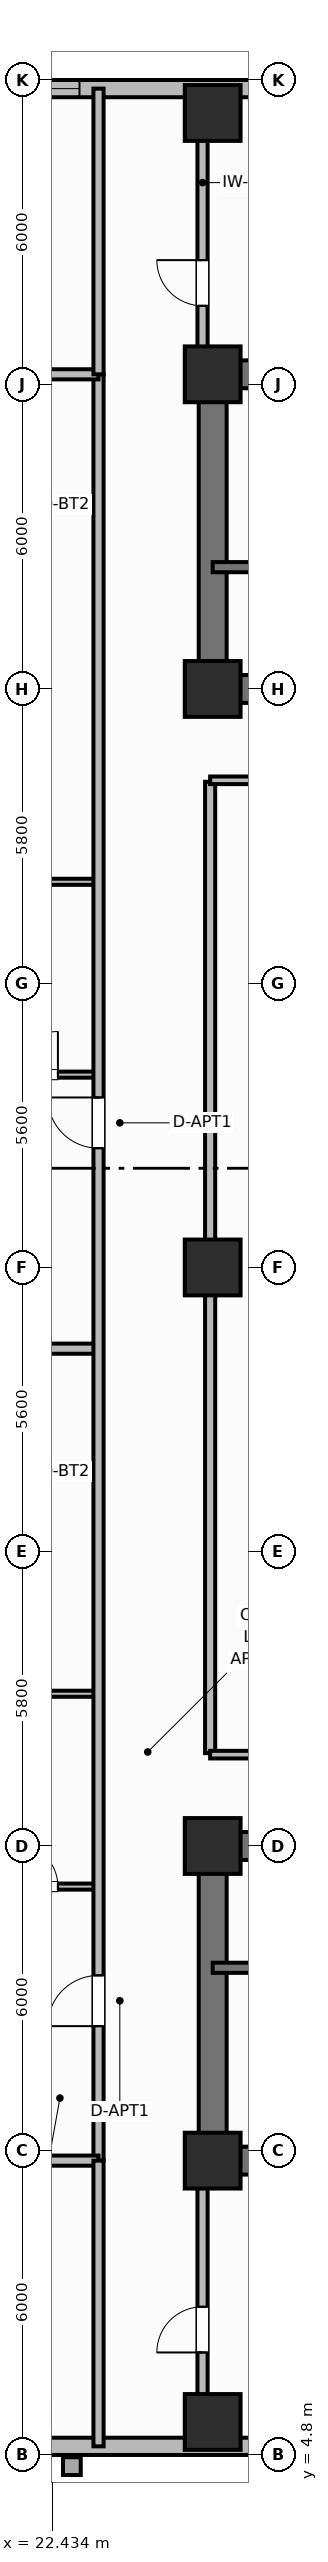
"""IFC4 building model, lengths in metres.
Left out: names, types, materials, properties, quantities, classifications, styles, units other than length and angle.
Written with IfcOpenShell. Run it as: python <this file> out.ifc"""

import sys

from ifc_helpers import new_model, si_unit, direction, frame, frame_2d, origin, origin_2d, place, context, subcontext, project, spatial, rectangle, extrude, element, fill, save


model = new_model("IFC4")
c1 = context("Model", 3, precision=1e-05, world=origin(), true_north=direction((0.0, 1.0)))
c2 = subcontext(c1, "Body", "Model", "MODEL_VIEW")
j1 = project(units=[si_unit("LENGTHUNIT", "METRE"), si_unit("PLANEANGLEUNIT", "RADIAN")], contexts=[c1])
p1 = place(None, origin())
s1 = spatial("IfcSite", under=j1, at=p1, CompositionType="ELEMENT")
p2 = place(p1, origin())
s2 = spatial("IfcBuilding", under=s1, at=p2, CompositionType="ELEMENT")
p3 = place(p2, frame((0.0, 0.0, 84.1)))
s3 = spatial("IfcBuildingStorey", under=s2, at=p3, CompositionType="ELEMENT", Elevation=84.1)
p4 = place(p3, frame((52.8, 10.6, 0.0), z_axis=(0.0, 0.0, 1.0), x_axis=(-1.0, 0.0, 0.0)))
e1 = element("IfcWall", 1, at=p4, inside=s3, PredefinedType="SHEAR", context=c2, shape_type="SweptSolid", body=[
    extrude(rectangle(XDim=27.2, YDim=0.55, at=frame_2d((13.6, 0.0))), origin(), (0.0, 0.0, 1.0), 4.2),
])
p5 = place(p3, frame((25.6, 10.875, 0.0), z_axis=(0.0, 0.0, 1.0), x_axis=(0.0, 1.0, 0.0)))
e2 = element("IfcWall", 2, at=p5, inside=s3, PredefinedType="SHEAR", context=c2, shape_type="SweptSolid", body=[
    extrude(rectangle(XDim=5.65, YDim=0.55, at=frame_2d((2.825, 0.0))), origin(), (0.0, 0.0, 1.0), 4.2),
])
p6 = place(p3, frame((25.6, 16.8, 0.0), z_axis=(0.0, 0.0, 1.0), x_axis=(1.0, 0.0, 0.0)))
e3 = element("IfcWall", 3, at=p6, inside=s3, PredefinedType="SHEAR", context=c2, shape_type="SweptSolid", body=[
    extrude(rectangle(XDim=27.2, YDim=0.55, at=frame_2d((13.6, 0.0))), origin(), (0.0, 0.0, 1.0), 4.2),
])
p7 = place(p6, frame((1.8, 0.0, 0.0)))
e4 = element("IfcOpeningElement", 4, at=p7, cuts=e3, PredefinedType="OPENING", context=c2, shape_type="SweptSolid", body=[
    extrude(rectangle(XDim=1.1, YDim=2.15, at=frame_2d((0.55, 1.075))), frame((0.0, 0.285, 0.0), z_axis=(0.0, -1.0, 0.0), x_axis=(1.0, 0.0, 0.0)), (0.0, 0.0, 1.0), 0.57),
])
p8 = place(p6, frame((5.6, 0.0, 0.0)))
e5 = element("IfcOpeningElement", 5, at=p8, cuts=e3, PredefinedType="OPENING", context=c2, shape_type="SweptSolid", body=[
    extrude(rectangle(XDim=0.85, YDim=2.1, at=frame_2d((0.425, 1.05))), frame((0.0, 0.285, 0.0), z_axis=(0.0, -1.0, 0.0), x_axis=(1.0, 0.0, 0.0)), (0.0, 0.0, 1.0), 0.57),
])
p9 = place(p6, frame((13.0, 0.0, 0.0)))
e6 = element("IfcOpeningElement", 6, at=p9, cuts=e3, PredefinedType="OPENING", context=c2, shape_type="SweptSolid", body=[
    extrude(rectangle(XDim=1.2, YDim=2.15, at=frame_2d((0.6, 1.075))), frame((0.0, 0.285, 0.0), z_axis=(0.0, -1.0, 0.0), x_axis=(1.0, 0.0, 0.0)), (0.0, 0.0, 1.0), 0.57),
])
p10 = place(p6, frame((20.4, 0.0, 0.0)))
e7 = element("IfcOpeningElement", 7, at=p10, cuts=e3, PredefinedType="OPENING", context=c2, shape_type="SweptSolid", body=[
    extrude(rectangle(XDim=1.3, YDim=2.2, at=frame_2d((0.65, 1.1))), frame((0.0, 0.285, 0.0), z_axis=(0.0, -1.0, 0.0), x_axis=(1.0, 0.0, 0.0)), (0.0, 0.0, 1.0), 0.57),
])
p11 = place(p6, frame((24.65, 0.0, 0.0)))
e8 = element("IfcOpeningElement", 8, at=p11, cuts=e3, PredefinedType="OPENING", context=c2, shape_type="SweptSolid", body=[
    extrude(rectangle(XDim=0.85, YDim=2.1, at=frame_2d((0.425, 1.05))), frame((0.0, 0.285, 0.0), z_axis=(0.0, -1.0, 0.0), x_axis=(1.0, 0.0, 0.0)), (0.0, 0.0, 1.0), 0.57),
])
p12 = place(p3, frame((25.6, 45.8, 0.0), z_axis=(0.0, 0.0, 1.0), x_axis=(1.0, 0.0, 0.0)))
e9 = element("IfcWall", 9, at=p12, inside=s3, PredefinedType="SHEAR", context=c2, shape_type="SweptSolid", body=[
    extrude(rectangle(XDim=27.2, YDim=0.55, at=frame_2d((13.6, 0.0))), origin(), (0.0, 0.0, 1.0), 4.2),
])
p13 = place(p3, frame((25.6, 39.875, 0.0), z_axis=(0.0, 0.0, 1.0), x_axis=(0.0, 1.0, 0.0)))
e10 = element("IfcWall", 10, at=p13, inside=s3, PredefinedType="SHEAR", context=c2, shape_type="SweptSolid", body=[
    extrude(rectangle(XDim=5.65, YDim=0.55, at=frame_2d((2.825, 0.0))), origin(), (0.0, 0.0, 1.0), 4.2),
])
p14 = place(p3, frame((52.8, 39.6, 0.0), z_axis=(0.0, 0.0, 1.0), x_axis=(-1.0, 0.0, 0.0)))
e11 = element("IfcWall", 11, at=p14, inside=s3, PredefinedType="SHEAR", context=c2, shape_type="SweptSolid", body=[
    extrude(rectangle(XDim=27.2, YDim=0.55, at=frame_2d((13.6, 0.0))), origin(), (0.0, 0.0, 1.0), 4.2),
])
p15 = place(p14, frame((24.2, 0.0, 0.0)))
e12 = element("IfcOpeningElement", 12, at=p15, cuts=e11, PredefinedType="OPENING", context=c2, shape_type="SweptSolid", body=[
    extrude(rectangle(XDim=1.1, YDim=2.15, at=frame_2d((0.55, 1.075))), frame((0.0, 0.285, 0.0), z_axis=(0.0, -1.0, 0.0), x_axis=(1.0, 0.0, 0.0)), (0.0, 0.0, 1.0), 0.57),
])
p16 = place(p14, frame((20.55, 0.0, 0.0)))
e13 = element("IfcOpeningElement", 13, at=p16, cuts=e11, PredefinedType="OPENING", context=c2, shape_type="SweptSolid", body=[
    extrude(rectangle(XDim=0.95, YDim=2.1, at=frame_2d((0.475, 1.05))), frame((0.0, 0.285, 0.0), z_axis=(0.0, -1.0, 0.0), x_axis=(1.0, 0.0, 0.0)), (0.0, 0.0, 1.0), 0.57),
])
p17 = place(p14, frame((15.1, 0.0, 0.0)))
e14 = element("IfcOpeningElement", 14, at=p17, cuts=e11, PredefinedType="OPENING", context=c2, shape_type="SweptSolid", body=[
    extrude(rectangle(XDim=1.2, YDim=2.15, at=frame_2d((0.6, 1.075))), frame((0.0, 0.285, 0.0), z_axis=(0.0, -1.0, 0.0), x_axis=(1.0, 0.0, 0.0)), (0.0, 0.0, 1.0), 0.57),
])
p18 = place(p14, frame((11.3, 0.0, 0.0)))
e15 = element("IfcOpeningElement", 15, at=p18, cuts=e11, PredefinedType="OPENING", context=c2, shape_type="SweptSolid", body=[
    extrude(rectangle(XDim=1.3, YDim=2.2, at=frame_2d((0.65, 1.1))), frame((0.0, 0.285, 0.0), z_axis=(0.0, -1.0, 0.0), x_axis=(1.0, 0.0, 0.0)), (0.0, 0.0, 1.0), 0.57),
])
p19 = place(p14, frame((7.25, 0.0, 0.0)))
e16 = element("IfcOpeningElement", 16, at=p19, cuts=e11, PredefinedType="OPENING", context=c2, shape_type="SweptSolid", body=[
    extrude(rectangle(XDim=0.85, YDim=2.1, at=frame_2d((0.425, 1.05))), frame((0.0, 0.285, 0.0), z_axis=(0.0, -1.0, 0.0), x_axis=(1.0, 0.0, 0.0)), (0.0, 0.0, 1.0), 0.57),
])
p20 = place(p14, frame((3.0, 0.0, 0.0)))
e17 = element("IfcOpeningElement", 17, at=p20, cuts=e11, PredefinedType="OPENING", context=c2, shape_type="SweptSolid", body=[
    extrude(rectangle(XDim=0.9, YDim=2.1, at=frame_2d((0.45, 1.05))), frame((0.0, 0.285, 0.0), z_axis=(0.0, -1.0, 0.0), x_axis=(1.0, 0.0, 0.0)), (0.0, 0.0, 1.0), 0.57),
])
for number, where, z_axis, x_axis in (
    (18, (25.6, 10.6, 0.0), (0.0, 0.0, 1.0), (1.0, 0.0, 0.0)),
    (19, (25.6, 16.8, 0.0), (0.0, 0.0, 1.0), (1.0, 0.0, 0.0)),
    (20, (25.6, 39.6, 0.0), (0.0, 0.0, 1.0), (1.0, 0.0, 0.0)),
    (21, (25.6, 45.8, 0.0), (0.0, 0.0, 1.0), (1.0, 0.0, 0.0)),
    (22, (25.6, 28.2, 0.0), (0.0, 0.0, 1.0), (1.0, 0.0, 0.0)),
    (23, (25.6, 5.45, 0.0), (0.0, 0.0, 1.0), (1.0, 0.0, 0.0)),
    (24, (25.6, 50.95, 0.0), (0.0, 0.0, 1.0), (1.0, 0.0, 0.0)),
):
    element("IfcColumn", number, at=place(p3, frame(where, z_axis=z_axis, x_axis=x_axis)), inside=s3, PredefinedType="COLUMN", context=c2, shape_type="SweptSolid", body=[
        extrude(rectangle(XDim=1.1, YDim=1.1, at=origin_2d()), origin(), (0.0, 0.0, 1.0), 4.2),
    ])
p21 = place(p3, frame((18.6, 4.97, 0.0), z_axis=(0.0, 0.0, 1.0), x_axis=(1.0, 0.0, 0.0)))
e25 = element("IfcWall", 25, at=p21, inside=s3, PredefinedType="SOLIDWALL", context=c2, shape_type="SweptSolid", body=[
    extrude(rectangle(XDim=8.45, YDim=0.34, at=frame_2d((4.225, 0.0))), origin(), (0.0, 0.0, 1.0), 3.2),
])
p22 = place(p21, frame((1.538, 0.0, 0.85)))
e26 = element("IfcOpeningElement", 26, at=p22, cuts=e25, PredefinedType="OPENING", context=c2, shape_type="SweptSolid", body=[
    extrude(rectangle(XDim=1.8, YDim=1.85, at=frame_2d((0.9, 0.925))), frame((0.0, 0.18, 0.0), z_axis=(0.0, -1.0, 0.0), x_axis=(1.0, 0.0, 0.0)), (0.0, 0.0, 1.0), 0.36),
])
p23 = place(p3, frame((28.35, 51.43, 0.0), z_axis=(0.0, 0.0, 1.0), x_axis=(-1.0, 0.0, 0.0)))
e27 = element("IfcWall", 27, at=p23, inside=s3, PredefinedType="SOLIDWALL", context=c2, shape_type="SweptSolid", body=[
    extrude(rectangle(XDim=9.75, YDim=0.34, at=frame_2d((4.875, 0.0))), origin(), (0.0, 0.0, 1.0), 3.2),
])
p24 = place(p23, frame((5.375, 0.0, 0.95)))
e28 = element("IfcOpeningElement", 28, at=p24, cuts=e27, PredefinedType="OPENING", context=c2, shape_type="SweptSolid", body=[
    extrude(rectangle(XDim=1.1, YDim=1.65, at=frame_2d((0.55, 0.825))), frame((0.0, 0.18, 0.0), z_axis=(0.0, -1.0, 0.0), x_axis=(1.0, 0.0, 0.0)), (0.0, 0.0, 1.0), 0.36),
])
p25 = place(p23, frame((7.142, 0.0, 0.95)))
e29 = element("IfcOpeningElement", 29, at=p25, cuts=e27, PredefinedType="OPENING", context=c2, shape_type="SweptSolid", body=[
    extrude(rectangle(XDim=1.1, YDim=1.65, at=frame_2d((0.55, 0.825))), frame((0.0, 0.18, 0.0), z_axis=(0.0, -1.0, 0.0), x_axis=(1.0, 0.0, 0.0)), (0.0, 0.0, 1.0), 0.36),
])
p26 = place(p3, frame((25.6, 14.4, 0.0), z_axis=(0.0, 0.0, 1.0), x_axis=(1.0, 0.0, 0.0)))
e30 = element("IfcWall", 30, at=p26, inside=s3, PredefinedType="SHEAR", context=c2, shape_type="SweptSolid", body=[
    extrude(rectangle(XDim=9.55, YDim=0.2, at=frame_2d((4.775, 0.0))), origin(), (0.0, 0.0, 1.0), 4.2),
])
p27 = place(p26, frame((1.05, 0.0, 0.0)))
e31 = element("IfcOpeningElement", 31, at=p27, cuts=e30, PredefinedType="OPENING", context=c2, shape_type="SweptSolid", body=[
    extrude(rectangle(XDim=1.1, YDim=2.15, at=frame_2d((0.55, 1.075))), frame((0.0, 0.11, 0.0), z_axis=(0.0, -1.0, 0.0), x_axis=(1.0, 0.0, 0.0)), (0.0, 0.0, 1.0), 0.22),
])
p28 = place(p3, frame((35.15, 42.0, 0.0), z_axis=(0.0, 0.0, 1.0), x_axis=(-1.0, 0.0, 0.0)))
e32 = element("IfcWall", 32, at=p28, inside=s3, PredefinedType="SHEAR", context=c2, shape_type="SweptSolid", body=[
    extrude(rectangle(XDim=9.55, YDim=0.2, at=frame_2d((4.775, 0.0))), origin(), (0.0, 0.0, 1.0), 4.2),
])
p29 = place(p28, frame((7.25, 0.0, 0.0)))
e33 = element("IfcOpeningElement", 33, at=p29, cuts=e32, PredefinedType="OPENING", context=c2, shape_type="SweptSolid", body=[
    extrude(rectangle(XDim=1.1, YDim=2.15, at=frame_2d((0.55, 1.075))), frame((0.0, 0.11, 0.0), z_axis=(0.0, -1.0, 0.0), x_axis=(1.0, 0.0, 0.0)), (0.0, 0.0, 1.0), 0.22),
])
p30 = place(p3, frame((25.55, 18.63, 0.0), z_axis=(0.0, 0.0, 1.0), x_axis=(0.0, 1.0, 0.0)))
e34 = element("IfcWall", 34, at=p30, inside=s3, PredefinedType="PARTITIONING", context=c2, shape_type="SweptSolid", body=[
    extrude(rectangle(XDim=19.14, YDim=0.2, at=frame_2d((9.57, 0.0))), origin(), (0.0, 0.0, 1.0), 3.03),
])
for number, where, z_axis, x_axis in (
    (35, (25.55, 18.6, 0.0), (0.0, 0.0, 1.0), (1.0, 0.0, 0.0)),
    (36, (25.55, 37.8, 0.0), (0.0, 0.0, 1.0), (1.0, 0.0, 0.0)),
):
    element("IfcWall", number, at=place(p3, frame(where, z_axis=z_axis, x_axis=x_axis)), inside=s3, PredefinedType="PARTITIONING", context=c2, shape_type="SweptSolid", body=[
        extrude(rectangle(XDim=12.5, YDim=0.15, at=frame_2d((6.25, 0.0))), origin(), (0.0, 0.0, 1.0), 3.03),
    ])
p31 = place(p3, frame((21.1, 16.0, 0.0), z_axis=(0.0, 0.0, 1.0), x_axis=(1.0, 0.0, 0.0)))
e37 = element("IfcWall", 37, at=p31, inside=s3, PredefinedType="PARTITIONING", context=c2, shape_type="SweptSolid", body=[
    extrude(rectangle(XDim=2.25, YDim=0.12, at=frame_2d((1.125, 0.0))), origin(), (0.0, 0.0, 1.0), 3.03),
])
p32 = place(p31, frame((0.6, 0.0, 0.0)))
e38 = element("IfcOpeningElement", 38, at=p32, cuts=e37, PredefinedType="OPENING", context=c2, shape_type="SweptSolid", body=[
    extrude(rectangle(XDim=0.85, YDim=2.1, at=frame_2d((0.425, 1.05))), frame((0.0, 0.07, 0.0), z_axis=(0.0, -1.0, 0.0), x_axis=(1.0, 0.0, 0.0)), (0.0, 0.0, 1.0), 0.14),
])
p33 = place(p3, frame((21.1, 19.8, 0.0), z_axis=(0.0, 0.0, 1.0), x_axis=(1.0, 0.0, 0.0)))
e39 = element("IfcWall", 39, at=p33, inside=s3, PredefinedType="PARTITIONING", context=c2, shape_type="SweptSolid", body=[
    extrude(rectangle(XDim=2.25, YDim=0.12, at=frame_2d((1.125, 0.0))), origin(), (0.0, 0.0, 1.0), 3.03),
])
p34 = place(p3, frame((14.856, 26.6, 0.0), z_axis=(0.0, 0.0, 1.0), x_axis=(1.0, 0.0, 0.0)))
e40 = element("IfcWall", 40, at=p34, inside=s3, PredefinedType="PARTITIONING", context=c2, shape_type="SweptSolid", body=[
    extrude(rectangle(XDim=8.494, YDim=0.2, at=frame_2d((4.247, 0.0))), origin(), (0.0, 0.0, 1.0), 3.03),
])
p35 = place(p3, frame((21.1, 32.0, 0.0), z_axis=(0.0, 0.0, 1.0), x_axis=(1.0, 0.0, 0.0)))
e41 = element("IfcWall", 41, at=p35, inside=s3, PredefinedType="PARTITIONING", context=c2, shape_type="SweptSolid", body=[
    extrude(rectangle(XDim=2.25, YDim=0.12, at=frame_2d((1.125, 0.0))), origin(), (0.0, 0.0, 1.0), 3.03),
])
p36 = place(p35, frame((0.6, 0.0, 0.0)))
e42 = element("IfcOpeningElement", 42, at=p36, cuts=e41, PredefinedType="OPENING", context=c2, shape_type="SweptSolid", body=[
    extrude(rectangle(XDim=0.85, YDim=2.1, at=frame_2d((0.425, 1.05))), frame((0.0, 0.07, 0.0), z_axis=(0.0, -1.0, 0.0), x_axis=(1.0, 0.0, 0.0)), (0.0, 0.0, 1.0), 0.14),
])
p37 = place(p3, frame((21.1, 35.8, 0.0), z_axis=(0.0, 0.0, 1.0), x_axis=(1.0, 0.0, 0.0)))
e43 = element("IfcWall", 43, at=p37, inside=s3, PredefinedType="PARTITIONING", context=c2, shape_type="SweptSolid", body=[
    extrude(rectangle(XDim=2.25, YDim=0.12, at=frame_2d((1.125, 0.0))), origin(), (0.0, 0.0, 1.0), 3.03),
])
p38 = place(p3, frame((23.35, 10.6, 0.0), z_axis=(0.0, 0.0, 1.0), x_axis=(0.0, 1.0, 0.0)))
e44 = element("IfcWall", 44, at=p38, inside=s3, PredefinedType="PARTITIONING", context=c2, shape_type="SweptSolid", body=[
    extrude(rectangle(XDim=35.2, YDim=0.2, at=frame_2d((17.6, 0.0))), origin(), (0.0, 0.0, 1.0), 3.03),
])
p39 = place(p38, frame((2.65, 0.0, 0.0)))
e45 = element("IfcOpeningElement", 45, at=p39, cuts=e44, PredefinedType="OPENING", context=c2, shape_type="SweptSolid", body=[
    extrude(rectangle(XDim=1.0, YDim=2.15, at=frame_2d((0.5, 1.075))), frame((0.0, 0.11, 0.0), z_axis=(0.0, -1.0, 0.0), x_axis=(1.0, 0.0, 0.0)), (0.0, 0.0, 1.0), 0.22),
])
p40 = place(p38, frame((19.95, 0.0, 0.0)))
e46 = element("IfcOpeningElement", 46, at=p40, cuts=e44, PredefinedType="OPENING", context=c2, shape_type="SweptSolid", body=[
    extrude(rectangle(XDim=1.0, YDim=2.15, at=frame_2d((0.5, 1.075))), frame((0.0, 0.11, 0.0), z_axis=(0.0, -1.0, 0.0), x_axis=(1.0, 0.0, 0.0)), (0.0, 0.0, 1.0), 0.22),
])
for number, where, z_axis, x_axis in (
    (47, (14.99, 10.6, 0.0), (0.0, 0.0, 1.0), (1.0, 0.0, 0.0)),
    (48, (14.99, 45.8, 0.0), (0.0, 0.0, 1.0), (1.0, 0.0, 0.0)),
):
    element("IfcWall", number, at=place(p3, frame(where, z_axis=z_axis, x_axis=x_axis)), inside=s3, PredefinedType="PARTITIONING", context=c2, shape_type="SweptSolid", body=[
        extrude(rectangle(XDim=8.36, YDim=0.2, at=frame_2d((4.18, 0.0))), origin(), (0.0, 0.0, 1.0), 3.03),
    ])
p41 = place(p3, frame((23.35, 4.97, 0.0), z_axis=(0.0, 0.0, 1.0), x_axis=(0.0, 1.0, 0.0)))
e49 = element("IfcWall", 49, at=p41, inside=s3, PredefinedType="PARTITIONING", context=c2, shape_type="SweptSolid", body=[
    extrude(rectangle(XDim=5.63, YDim=0.2, at=frame_2d((2.815, 0.0))), origin(), (0.0, 0.0, 1.0), 3.03),
])
p42 = place(p3, frame((23.35, 45.8, 0.0), z_axis=(0.0, 0.0, 1.0), x_axis=(0.0, 1.0, 0.0)))
e50 = element("IfcWall", 50, at=p42, inside=s3, PredefinedType="PARTITIONING", context=c2, shape_type="SweptSolid", body=[
    extrude(rectangle(XDim=5.63, YDim=0.2, at=frame_2d((2.815, 0.0))), origin(), (0.0, 0.0, 1.0), 3.03),
])
p43 = place(p3, frame((25.4, 5.52, 0.0), z_axis=(0.0, 0.0, 1.0), x_axis=(0.0, 1.0, 0.0)))
e51 = element("IfcWall", 51, at=p43, inside=s3, PredefinedType="PARTITIONING", context=c2, shape_type="SweptSolid", body=[
    extrude(rectangle(XDim=4.78, YDim=0.2, at=frame_2d((2.39, 0.0))), origin(), (0.0, 0.0, 1.0), 3.03),
])
p44 = place(p43, frame((1.3, 0.0, 0.0)))
e52 = element("IfcOpeningElement", 52, at=p44, cuts=e51, PredefinedType="OPENING", context=c2, shape_type="SweptSolid", body=[
    extrude(rectangle(XDim=0.9, YDim=2.1, at=frame_2d((0.45, 1.05))), frame((0.0, 0.11, 0.0), z_axis=(0.0, -1.0, 0.0), x_axis=(1.0, 0.0, 0.0)), (0.0, 0.0, 1.0), 0.22),
])
p45 = place(p3, frame((25.4, 46.1, 0.0), z_axis=(0.0, 0.0, 1.0), x_axis=(0.0, 1.0, 0.0)))
e53 = element("IfcWall", 53, at=p45, inside=s3, PredefinedType="PARTITIONING", context=c2, shape_type="SweptSolid", body=[
    extrude(rectangle(XDim=4.78, YDim=0.2, at=frame_2d((2.39, 0.0))), origin(), (0.0, 0.0, 1.0), 3.03),
])
p46 = place(p45, frame((1.05, 0.0, 0.0)))
e54 = element("IfcOpeningElement", 54, at=p46, cuts=e53, PredefinedType="OPENING", context=c2, shape_type="SweptSolid", body=[
    extrude(rectangle(XDim=0.9, YDim=2.1, at=frame_2d((0.45, 1.05))), frame((0.0, 0.11, 0.0), z_axis=(0.0, -1.0, 0.0), x_axis=(1.0, 0.0, 0.0)), (0.0, 0.0, 1.0), 0.22),
])
p47 = place(p24, origin())
e55 = element("IfcWindow", 55, at=p47, inside=s3, PartitioningType="SINGLE_PANEL", PredefinedType="WINDOW", context=c2, shape_type="SweptSolid", body=[
    extrude(rectangle(XDim=1.1, YDim=1.65, at=frame_2d((0.55, 0.825))), frame((0.0, 0.03, 0.0), z_axis=(0.0, -1.0, 0.0), x_axis=(1.0, 0.0, 0.0)), (0.0, 0.0, 1.0), 0.06),
])
fill(e28, e55)
p48 = place(p32, origin())
e56 = element("IfcDoor", 56, at=p48, inside=s3, OperationType="SINGLE_SWING_LEFT", PredefinedType="DOOR", context=c2, shape_type="SweptSolid", body=[
    extrude(rectangle(XDim=0.85, YDim=2.1, at=frame_2d((0.425, 1.05))), frame((0.0, 0.025, 0.0), z_axis=(0.0, -1.0, 0.0), x_axis=(1.0, 0.0, 0.0)), (0.0, 0.0, 1.0), 0.05),
])
fill(e38, e56)
p49 = place(p36, origin())
e57 = element("IfcDoor", 57, at=p49, inside=s3, OperationType="SINGLE_SWING_RIGHT", PredefinedType="DOOR", context=c2, shape_type="SweptSolid", body=[
    extrude(rectangle(XDim=0.85, YDim=2.1, at=frame_2d((0.425, 1.05))), frame((0.0, 0.025, 0.0), z_axis=(0.0, -1.0, 0.0), x_axis=(1.0, 0.0, 0.0)), (0.0, 0.0, 1.0), 0.05),
])
fill(e42, e57)
p50 = place(p39, origin())
e58 = element("IfcDoor", 58, at=p50, inside=s3, OperationType="SINGLE_SWING_LEFT", PredefinedType="DOOR", context=c2, shape_type="SweptSolid", body=[
    extrude(rectangle(XDim=1.0, YDim=2.15, at=frame_2d((0.5, 1.075))), frame((0.0, 0.025, 0.0), z_axis=(0.0, -1.0, 0.0), x_axis=(1.0, 0.0, 0.0)), (0.0, 0.0, 1.0), 0.05),
])
fill(e45, e58)
p51 = place(p40, origin())
e59 = element("IfcDoor", 59, at=p51, inside=s3, OperationType="SINGLE_SWING_RIGHT", PredefinedType="DOOR", context=c2, shape_type="SweptSolid", body=[
    extrude(rectangle(XDim=1.0, YDim=2.15, at=frame_2d((0.5, 1.075))), frame((0.0, 0.025, 0.0), z_axis=(0.0, -1.0, 0.0), x_axis=(1.0, 0.0, 0.0)), (0.0, 0.0, 1.0), 0.05),
])
fill(e46, e59)
p52 = place(p44, origin())
e60 = element("IfcDoor", 60, at=p52, inside=s3, OperationType="SINGLE_SWING_LEFT", PredefinedType="DOOR", context=c2, shape_type="SweptSolid", body=[
    extrude(rectangle(XDim=0.9, YDim=2.1, at=frame_2d((0.45, 1.05))), frame((0.0, 0.025, 0.0), z_axis=(0.0, -1.0, 0.0), x_axis=(1.0, 0.0, 0.0)), (0.0, 0.0, 1.0), 0.05),
])
fill(e52, e60)
p53 = place(p46, origin())
e61 = element("IfcDoor", 61, at=p53, inside=s3, OperationType="SINGLE_SWING_RIGHT", PredefinedType="DOOR", context=c2, shape_type="SweptSolid", body=[
    extrude(rectangle(XDim=0.9, YDim=2.1, at=frame_2d((0.45, 1.05))), frame((0.0, 0.025, 0.0), z_axis=(0.0, -1.0, 0.0), x_axis=(1.0, 0.0, 0.0)), (0.0, 0.0, 1.0), 0.05),
])
fill(e54, e61)
save(model, sys.argv[1])
